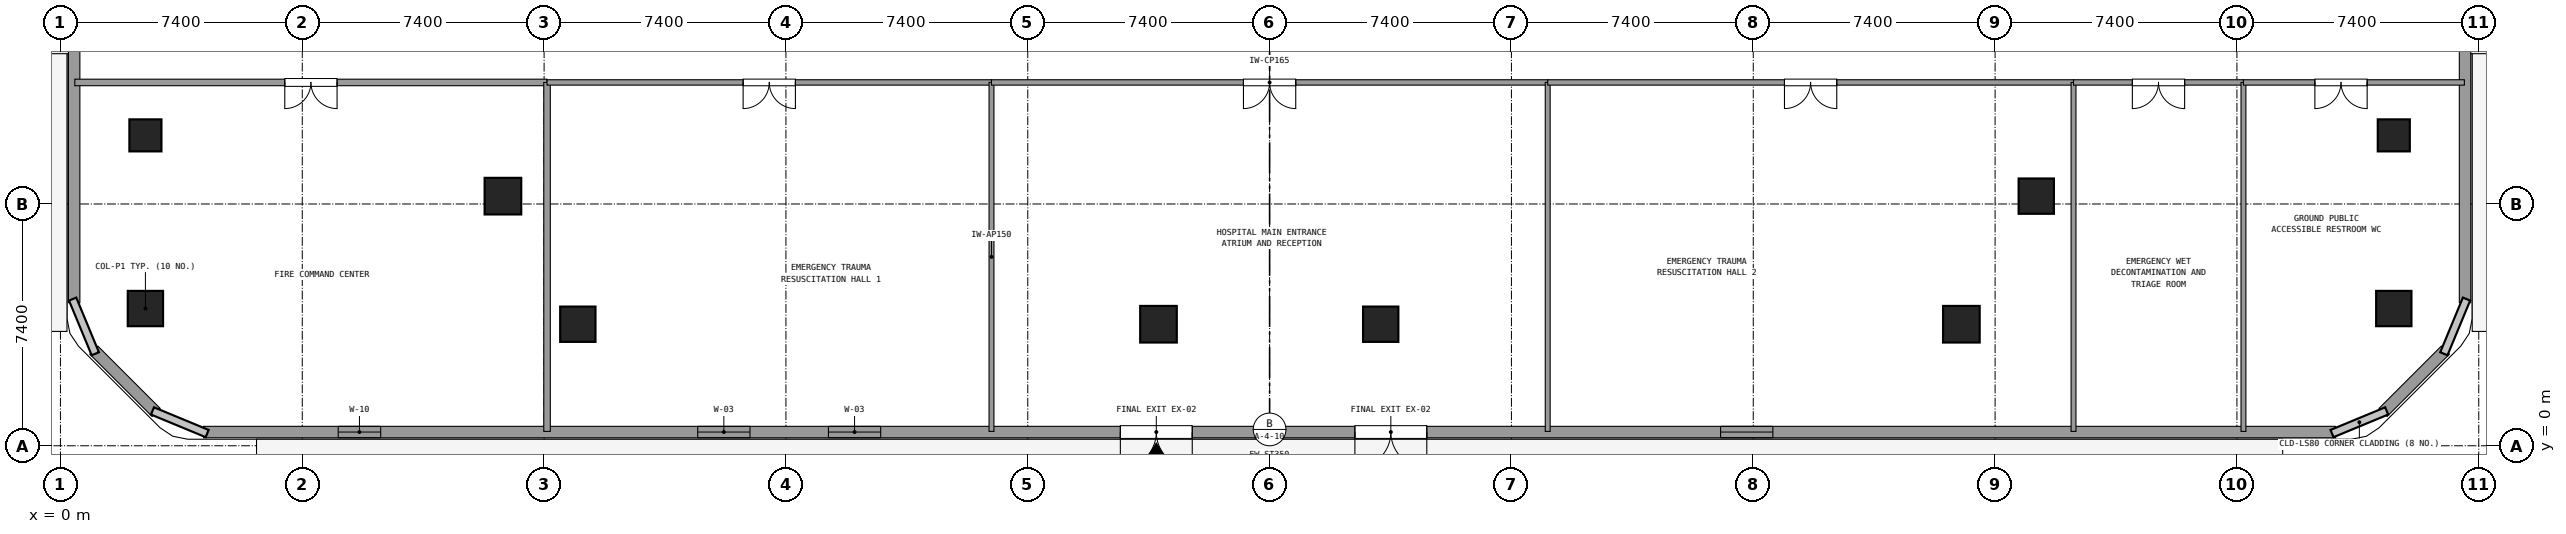
"""IFC4 building model, lengths in metres.
Left out: names, types, materials, properties, quantities, classifications, styles, units other than length and angle.
Written with IfcOpenShell. Run it as: python <this file> out.ifc"""

import sys

from ifc_helpers import new_model, si_unit, direction, frame, frame_2d, origin, origin_2d, place, context, subcontext, project, spatial, rectangle, circle, extrude, element, fill, save


model = new_model("IFC4")
c1 = context("Model", 3, precision=1e-05, world=origin(), true_north=direction((0.0, 1.0)))
c2 = subcontext(c1, "Body", "Model", "MODEL_VIEW")
j1 = project(units=[si_unit("LENGTHUNIT", "METRE"), si_unit("PLANEANGLEUNIT", "RADIAN")], contexts=[c1])
p1 = place(None, origin())
s1 = spatial("IfcSite", under=j1, at=p1, CompositionType="ELEMENT")
p2 = place(p1, origin())
s2 = spatial("IfcBuilding", under=s1, at=p2, CompositionType="ELEMENT")
p3 = place(p2, origin())
s3 = spatial("IfcBuildingStorey", under=s2, at=p3, CompositionType="ELEMENT", Elevation=0.0)
p4 = place(p3, frame((13.54, 7.64, 0.0), z_axis=(0.0, 0.0, 1.0), x_axis=(1.0, 0.0, 0.0)))
e1 = element("IfcColumn", 1, at=p4, inside=s3, PredefinedType="COLUMN", context=c2, shape_type="SweptSolid", body=[
    extrude(circle(Radius=0.56, at=origin_2d()), origin(), (0.0, 0.0, 1.0), 5.4),
])
p5 = place(p3, frame((15.832, 3.72, 0.0), z_axis=(0.0, 0.0, 1.0), x_axis=(1.0, 0.0, 0.0)))
e2 = element("IfcColumn", 2, at=p5, inside=s3, PredefinedType="COLUMN", context=c2, shape_type="SweptSolid", body=[
    extrude(rectangle(XDim=1.08, YDim=1.08, at=origin_2d()), origin(), (0.0, 0.0, 1.0), 5.4),
])
p6 = place(p3, frame((33.6, 3.72, 0.0), z_axis=(0.0, 0.0, 1.0), x_axis=(1.0, 0.0, 0.0)))
e3 = element("IfcColumn", 3, at=p6, inside=s3, PredefinedType="COLUMN", context=c2, shape_type="SweptSolid", body=[
    extrude(circle(Radius=0.56, at=origin_2d()), origin(), (0.0, 0.0, 1.0), 5.4),
])
p7 = place(p3, frame((40.4, 3.72, 0.0), z_axis=(0.0, 0.0, 1.0), x_axis=(1.0, 0.0, 0.0)))
e4 = element("IfcColumn", 4, at=p7, inside=s3, PredefinedType="COLUMN", context=c2, shape_type="SweptSolid", body=[
    extrude(rectangle(XDim=1.08, YDim=1.08, at=origin_2d()), origin(), (0.0, 0.0, 1.0), 5.4),
])
p8 = place(p3, frame((58.168, 3.72, 0.0), z_axis=(0.0, 0.0, 1.0), x_axis=(1.0, 0.0, 0.0)))
e5 = element("IfcColumn", 5, at=p8, inside=s3, PredefinedType="COLUMN", context=c2, shape_type="SweptSolid", body=[
    extrude(circle(Radius=0.56, at=origin_2d()), origin(), (0.0, 0.0, 1.0), 5.4),
])
for number, where, z_axis, x_axis in (
    (6, (60.46, 7.64, 0.0), (0.0, 0.0, 1.0), (1.0, 0.0, 0.0)),
    (7, (2.6, 4.2, 0.0), (0.0, 0.0, 1.0), (1.0, 0.0, 0.0)),
    (8, (71.4, 4.2, 0.0), (0.0, 0.0, 1.0), (1.0, 0.0, 0.0)),
):
    element("IfcColumn", number, at=place(p3, frame(where, z_axis=z_axis, x_axis=x_axis)), inside=s3, PredefinedType="COLUMN", context=c2, shape_type="SweptSolid", body=[
        extrude(rectangle(XDim=1.08, YDim=1.08, at=origin_2d()), origin(), (0.0, 0.0, 1.0), 5.4),
    ])
for number, where, z_axis, x_axis in (
    (9, (2.6, 9.5, 0.0), (0.0, 0.0, 1.0), (1.0, 0.0, 0.0)),
    (10, (71.4, 9.5, 0.0), (0.0, 0.0, 1.0), (1.0, 0.0, 0.0)),
):
    element("IfcColumn", number, at=place(p3, frame(where, z_axis=z_axis, x_axis=x_axis)), inside=s3, PredefinedType="PILASTER", context=c2, shape_type="SweptSolid", body=[
        extrude(circle(Radius=0.49, at=origin_2d()), origin(), (0.0, 0.0, 1.0), 5.4),
    ])
p9 = place(p3, frame((4.379, 0.42, 0.0), z_axis=(0.0, 0.0, 1.0), x_axis=(1.0, 0.0, 0.0)))
e11 = element("IfcWall", 11, at=p9, inside=s3, PredefinedType="SOLIDWALL", context=c2, shape_type="SweptSolid", body=[
    extrude(rectangle(XDim=65.242, YDim=0.35, at=frame_2d((32.621, 0.0))), origin(), (0.0, 0.0, 1.0), 4.14),
])
p10 = place(p9, frame((28.054, 0.0, 0.0)))
e12 = element("IfcOpeningElement", 12, at=p10, cuts=e11, PredefinedType="OPENING", context=c2, shape_type="SweptSolid", body=[
    extrude(rectangle(XDim=2.2, YDim=2.45, at=frame_2d((1.1, 1.225))), frame((0.0, 0.185, 0.0), z_axis=(0.0, -1.0, 0.0), x_axis=(1.0, 0.0, 0.0)), (0.0, 0.0, 1.0), 0.37),
])
p11 = place(p9, frame((35.231, 0.0, 0.0)))
e13 = element("IfcOpeningElement", 13, at=p11, cuts=e11, PredefinedType="OPENING", context=c2, shape_type="SweptSolid", body=[
    extrude(rectangle(XDim=2.2, YDim=2.45, at=frame_2d((1.1, 1.225))), frame((0.0, 0.185, 0.0), z_axis=(0.0, -1.0, 0.0), x_axis=(1.0, 0.0, 0.0)), (0.0, 0.0, 1.0), 0.37),
])
p12 = place(p9, frame((4.121, 0.0, 1.1)))
e14 = element("IfcOpeningElement", 14, at=p12, cuts=e11, PredefinedType="OPENING", context=c2, shape_type="SweptSolid", body=[
    extrude(rectangle(XDim=1.3, YDim=1.4, at=frame_2d((0.65, 0.7))), frame((0.0, 0.185, 0.0), z_axis=(0.0, -1.0, 0.0), x_axis=(1.0, 0.0, 0.0)), (0.0, 0.0, 1.0), 0.37),
])
p13 = place(p9, frame((15.121, 0.0, 1.05)))
e15 = element("IfcOpeningElement", 15, at=p13, cuts=e11, PredefinedType="OPENING", context=c2, shape_type="SweptSolid", body=[
    extrude(rectangle(XDim=1.6, YDim=1.5, at=frame_2d((0.8, 0.75))), frame((0.0, 0.185, 0.0), z_axis=(0.0, -1.0, 0.0), x_axis=(1.0, 0.0, 0.0)), (0.0, 0.0, 1.0), 0.37),
])
p14 = place(p9, frame((19.121, 0.0, 1.05)))
e16 = element("IfcOpeningElement", 16, at=p14, cuts=e11, PredefinedType="OPENING", context=c2, shape_type="SweptSolid", body=[
    extrude(rectangle(XDim=1.6, YDim=1.5, at=frame_2d((0.8, 0.75))), frame((0.0, 0.185, 0.0), z_axis=(0.0, -1.0, 0.0), x_axis=(1.0, 0.0, 0.0)), (0.0, 0.0, 1.0), 0.37),
])
p15 = place(p9, frame((46.421, 0.0, 1.05)))
e17 = element("IfcOpeningElement", 17, at=p15, cuts=e11, PredefinedType="OPENING", context=c2, shape_type="SweptSolid", body=[
    extrude(rectangle(XDim=1.6, YDim=1.5, at=frame_2d((0.8, 0.75))), frame((0.0, 0.185, 0.0), z_axis=(0.0, -1.0, 0.0), x_axis=(1.0, 0.0, 0.0)), (0.0, 0.0, 1.0), 0.37),
])
p16 = place(p3, frame((71.072, 1.021, 0.0), z_axis=(0.0, 0.0, 1.0), x_axis=(0.707106781187, 0.707106781187, 0.0)))
e18 = element("IfcWall", 18, at=p16, inside=s3, PredefinedType="SOLIDWALL", context=c2, shape_type="SweptSolid", body=[
    extrude(rectangle(XDim=2.697, YDim=0.35, at=frame_2d((1.348, 0.0))), origin(), (0.0, 0.0, 1.0), 4.14),
])
p17 = place(p3, frame((73.58, 4.379, 0.0), z_axis=(0.0, 0.0, 1.0), x_axis=(0.0, 1.0, 0.0)))
e19 = element("IfcWall", 19, at=p17, inside=s3, PredefinedType="SOLIDWALL", context=c2, shape_type="SweptSolid", body=[
    extrude(rectangle(XDim=43.042, YDim=0.35, at=frame_2d((21.521, 0.0))), origin(), (0.0, 0.0, 1.0), 4.14),
])
p18 = place(p17, frame((14.071, 0.0, 0.0)))
e20 = element("IfcOpeningElement", 20, at=p18, cuts=e19, PredefinedType="OPENING", context=c2, shape_type="SweptSolid", body=[
    extrude(rectangle(XDim=2.1, YDim=2.4, at=frame_2d((1.05, 1.2))), frame((0.0, 0.185, 0.0), z_axis=(0.0, -1.0, 0.0), x_axis=(1.0, 0.0, 0.0)), (0.0, 0.0, 1.0), 0.37),
])
p19 = place(p17, frame((37.121, 0.0, 0.0)))
e21 = element("IfcOpeningElement", 21, at=p19, cuts=e19, PredefinedType="OPENING", context=c2, shape_type="SweptSolid", body=[
    extrude(rectangle(XDim=3.8, YDim=2.85, at=frame_2d((1.9, 1.425))), frame((0.0, 0.185, 0.0), z_axis=(0.0, -1.0, 0.0), x_axis=(1.0, 0.0, 0.0)), (0.0, 0.0, 1.0), 0.37),
])
p20 = place(p3, frame((0.42, 47.421, 0.0), z_axis=(0.0, 0.0, 1.0), x_axis=(0.0, -1.0, 0.0)))
e22 = element("IfcWall", 22, at=p20, inside=s3, PredefinedType="SOLIDWALL", context=c2, shape_type="SweptSolid", body=[
    extrude(rectangle(XDim=43.042, YDim=0.35, at=frame_2d((21.521, 0.0))), origin(), (0.0, 0.0, 1.0), 4.14),
])
p21 = place(p20, frame((26.871, 0.0, 0.0)))
e23 = element("IfcOpeningElement", 23, at=p21, cuts=e22, PredefinedType="OPENING", context=c2, shape_type="SweptSolid", body=[
    extrude(rectangle(XDim=2.4, YDim=2.5, at=frame_2d((1.2, 1.25))), frame((0.0, 0.185, 0.0), z_axis=(0.0, -1.0, 0.0), x_axis=(1.0, 0.0, 0.0)), (0.0, 0.0, 1.0), 0.37),
])
p22 = place(p20, frame((2.5, 0.0, 1.2)))
e24 = element("IfcOpeningElement", 24, at=p22, cuts=e22, PredefinedType="OPENING", context=c2, shape_type="SweptSolid", body=[
    extrude(rectangle(XDim=2.2, YDim=1.6, at=frame_2d((1.1, 0.8))), frame((0.0, 0.185, 0.0), z_axis=(0.0, -1.0, 0.0), x_axis=(1.0, 0.0, 0.0)), (0.0, 0.0, 1.0), 0.37),
])
p23 = place(p3, frame((1.021, 2.928, 0.0), z_axis=(0.0, 0.0, 1.0), x_axis=(0.707106781187, -0.707106781187, 0.0)))
e25 = element("IfcWall", 25, at=p23, inside=s3, PredefinedType="SOLIDWALL", context=c2, shape_type="SweptSolid", body=[
    extrude(rectangle(XDim=2.697, YDim=0.35, at=frame_2d((1.348, 0.0))), origin(), (0.0, 0.0, 1.0), 4.14),
])
p24 = place(p3, frame((0.44, 11.12, 0.0), z_axis=(0.0, 0.0, 1.0), x_axis=(1.0, 0.0, 0.0)))
e26 = element("IfcWall", 26, at=p24, inside=s3, PredefinedType="SOLIDWALL", context=c2, shape_type="SweptSolid", body=[
    extrude(rectangle(XDim=14.45, YDim=0.2, at=frame_2d((7.225, 0.0))), origin(), (0.0, 0.0, 1.0), 4.11),
])
p25 = place(p24, frame((6.425, 0.0, 0.0)))
e27 = element("IfcOpeningElement", 27, at=p25, cuts=e26, PredefinedType="OPENING", context=c2, shape_type="SweptSolid", body=[
    extrude(rectangle(XDim=1.6, YDim=2.2, at=frame_2d((0.8, 1.1))), frame((0.0, 0.11, 0.0), z_axis=(0.0, -1.0, 0.0), x_axis=(1.0, 0.0, 0.0)), (0.0, 0.0, 1.0), 0.22),
])
p26 = place(p3, frame((14.89, 0.44, 0.0), z_axis=(0.0, 0.0, 1.0), x_axis=(0.0, 1.0, 0.0)))
e28 = element("IfcWall", 28, at=p26, inside=s3, PredefinedType="SOLIDWALL", context=c2, shape_type="SweptSolid", body=[
    extrude(rectangle(XDim=10.68, YDim=0.2, at=frame_2d((5.34, 0.0))), origin(), (0.0, 0.0, 1.0), 4.11),
])
p27 = place(p3, frame((14.89, 11.12, 0.0), z_axis=(0.0, 0.0, 1.0), x_axis=(1.0, 0.0, 0.0)))
e29 = element("IfcWall", 29, at=p27, inside=s3, PredefinedType="PARTITIONING", context=c2, shape_type="SweptSolid", body=[
    extrude(rectangle(XDim=13.6, YDim=0.165, at=frame_2d((6.8, 0.0))), origin(), (0.0, 0.0, 1.0), 4.11),
])
p28 = place(p27, frame((6.0, 0.0, 0.0)))
e30 = element("IfcOpeningElement", 30, at=p28, cuts=e29, PredefinedType="OPENING", context=c2, shape_type="SweptSolid", body=[
    extrude(rectangle(XDim=1.6, YDim=2.2, at=frame_2d((0.8, 1.1))), frame((0.0, 0.093, 0.0), z_axis=(0.0, -1.0, 0.0), x_axis=(1.0, 0.0, 0.0)), (0.0, 0.0, 1.0), 0.185),
])
p29 = place(p3, frame((28.49, 0.44, 0.0), z_axis=(0.0, 0.0, 1.0), x_axis=(0.0, 1.0, 0.0)))
e31 = element("IfcWall", 31, at=p29, inside=s3, PredefinedType="PARTITIONING", context=c2, shape_type="SweptSolid", body=[
    extrude(rectangle(XDim=10.68, YDim=0.15, at=frame_2d((5.34, 0.0))), origin(), (0.0, 0.0, 1.0), 4.11),
])
p30 = place(p3, frame((28.49, 11.12, 0.0), z_axis=(0.0, 0.0, 1.0), x_axis=(1.0, 0.0, 0.0)))
e32 = element("IfcWall", 32, at=p30, inside=s3, PredefinedType="PARTITIONING", context=c2, shape_type="SweptSolid", body=[
    extrude(rectangle(XDim=17.02, YDim=0.165, at=frame_2d((8.51, 0.0))), origin(), (0.0, 0.0, 1.0), 4.11),
])
p31 = place(p30, frame((7.71, 0.0, 0.0)))
e33 = element("IfcOpeningElement", 33, at=p31, cuts=e32, PredefinedType="OPENING", context=c2, shape_type="SweptSolid", body=[
    extrude(rectangle(XDim=1.6, YDim=2.2, at=frame_2d((0.8, 1.1))), frame((0.0, 0.093, 0.0), z_axis=(0.0, -1.0, 0.0), x_axis=(1.0, 0.0, 0.0)), (0.0, 0.0, 1.0), 0.185),
])
p32 = place(p3, frame((45.51, 0.44, 0.0), z_axis=(0.0, 0.0, 1.0), x_axis=(0.0, 1.0, 0.0)))
e34 = element("IfcWall", 34, at=p32, inside=s3, PredefinedType="PARTITIONING", context=c2, shape_type="SweptSolid", body=[
    extrude(rectangle(XDim=10.68, YDim=0.15, at=frame_2d((5.34, 0.0))), origin(), (0.0, 0.0, 1.0), 4.11),
])
p33 = place(p3, frame((45.51, 11.12, 0.0), z_axis=(0.0, 0.0, 1.0), x_axis=(1.0, 0.0, 0.0)))
e35 = element("IfcWall", 35, at=p33, inside=s3, PredefinedType="PARTITIONING", context=c2, shape_type="SweptSolid", body=[
    extrude(rectangle(XDim=16.09, YDim=0.165, at=frame_2d((8.045, 0.0))), origin(), (0.0, 0.0, 1.0), 4.11),
])
p34 = place(p33, frame((7.245, 0.0, 0.0)))
e36 = element("IfcOpeningElement", 36, at=p34, cuts=e35, PredefinedType="OPENING", context=c2, shape_type="SweptSolid", body=[
    extrude(rectangle(XDim=1.6, YDim=2.2, at=frame_2d((0.8, 1.1))), frame((0.0, 0.093, 0.0), z_axis=(0.0, -1.0, 0.0), x_axis=(1.0, 0.0, 0.0)), (0.0, 0.0, 1.0), 0.185),
])
p35 = place(p3, frame((61.6, 0.44, 0.0), z_axis=(0.0, 0.0, 1.0), x_axis=(0.0, 1.0, 0.0)))
e37 = element("IfcWall", 37, at=p35, inside=s3, PredefinedType="PARTITIONING", context=c2, shape_type="SweptSolid", body=[
    extrude(rectangle(XDim=10.68, YDim=0.15, at=frame_2d((5.34, 0.0))), origin(), (0.0, 0.0, 1.0), 4.11),
])
p36 = place(p3, frame((61.6, 11.12, 0.0), z_axis=(0.0, 0.0, 1.0), x_axis=(1.0, 0.0, 0.0)))
e38 = element("IfcWall", 38, at=p36, inside=s3, PredefinedType="PARTITIONING", context=c2, shape_type="SweptSolid", body=[
    extrude(rectangle(XDim=5.2, YDim=0.165, at=frame_2d((2.6, 0.0))), origin(), (0.0, 0.0, 1.0), 4.11),
])
p37 = place(p36, frame((1.8, 0.0, 0.0)))
e39 = element("IfcOpeningElement", 39, at=p37, cuts=e38, PredefinedType="OPENING", context=c2, shape_type="SweptSolid", body=[
    extrude(rectangle(XDim=1.6, YDim=2.2, at=frame_2d((0.8, 1.1))), frame((0.0, 0.093, 0.0), z_axis=(0.0, -1.0, 0.0), x_axis=(1.0, 0.0, 0.0)), (0.0, 0.0, 1.0), 0.185),
])
p38 = place(p3, frame((66.8, 0.44, 0.0), z_axis=(0.0, 0.0, 1.0), x_axis=(0.0, 1.0, 0.0)))
e40 = element("IfcWall", 40, at=p38, inside=s3, PredefinedType="PARTITIONING", context=c2, shape_type="SweptSolid", body=[
    extrude(rectangle(XDim=10.68, YDim=0.15, at=frame_2d((5.34, 0.0))), origin(), (0.0, 0.0, 1.0), 4.11),
])
p39 = place(p3, frame((66.8, 11.12, 0.0), z_axis=(0.0, 0.0, 1.0), x_axis=(1.0, 0.0, 0.0)))
e41 = element("IfcWall", 41, at=p39, inside=s3, PredefinedType="PARTITIONING", context=c2, shape_type="SweptSolid", body=[
    extrude(rectangle(XDim=6.76, YDim=0.165, at=frame_2d((3.38, 0.0))), origin(), (0.0, 0.0, 1.0), 4.11),
])
p40 = place(p39, frame((2.185, 0.0, 0.0)))
e42 = element("IfcOpeningElement", 42, at=p40, cuts=e41, PredefinedType="OPENING", context=c2, shape_type="SweptSolid", body=[
    extrude(rectangle(XDim=1.6, YDim=2.2, at=frame_2d((0.8, 1.1))), frame((0.0, 0.093, 0.0), z_axis=(0.0, -1.0, 0.0), x_axis=(1.0, 0.0, 0.0)), (0.0, 0.0, 1.0), 0.185),
])
p41 = place(p10, frame((2.2, 0.0, 0.0), z_axis=(0.0, 0.0, 1.0), x_axis=(-1.0, 0.0, 0.0)))
e43 = element("IfcDoor", 43, at=p41, inside=s3, OperationType="DOUBLE_DOOR_SINGLE_SWING", PredefinedType="DOOR", context=c2, shape_type="SweptSolid", body=[
    extrude(rectangle(XDim=2.2, YDim=2.45, at=frame_2d((1.1, 1.225))), frame((0.0, 0.025, 0.0), z_axis=(0.0, -1.0, 0.0), x_axis=(1.0, 0.0, 0.0)), (0.0, 0.0, 1.0), 0.05),
])
fill(e12, e43)
p42 = place(p11, frame((2.2, 0.0, 0.0), z_axis=(0.0, 0.0, 1.0), x_axis=(-1.0, 0.0, 0.0)))
e44 = element("IfcDoor", 44, at=p42, inside=s3, OperationType="DOUBLE_DOOR_SINGLE_SWING", PredefinedType="DOOR", context=c2, shape_type="SweptSolid", body=[
    extrude(rectangle(XDim=2.2, YDim=2.45, at=frame_2d((1.1, 1.225))), frame((0.0, 0.025, 0.0), z_axis=(0.0, -1.0, 0.0), x_axis=(1.0, 0.0, 0.0)), (0.0, 0.0, 1.0), 0.05),
])
fill(e13, e44)
p43 = place(p12, origin())
e45 = element("IfcWindow", 45, at=p43, inside=s3, PartitioningType="SINGLE_PANEL", PredefinedType="WINDOW", context=c2, shape_type="SweptSolid", body=[
    extrude(rectangle(XDim=1.3, YDim=1.4, at=frame_2d((0.65, 0.7))), frame((0.0, 0.03, 0.0), z_axis=(0.0, -1.0, 0.0), x_axis=(1.0, 0.0, 0.0)), (0.0, 0.0, 1.0), 0.06),
])
fill(e14, e45)
p44 = place(p13, origin())
e46 = element("IfcWindow", 46, at=p44, inside=s3, PartitioningType="SINGLE_PANEL", PredefinedType="WINDOW", context=c2, shape_type="SweptSolid", body=[
    extrude(rectangle(XDim=1.6, YDim=1.5, at=frame_2d((0.8, 0.75))), frame((0.0, 0.03, 0.0), z_axis=(0.0, -1.0, 0.0), x_axis=(1.0, 0.0, 0.0)), (0.0, 0.0, 1.0), 0.06),
])
fill(e15, e46)
p45 = place(p14, origin())
e47 = element("IfcWindow", 47, at=p45, inside=s3, PartitioningType="SINGLE_PANEL", PredefinedType="WINDOW", context=c2, shape_type="SweptSolid", body=[
    extrude(rectangle(XDim=1.6, YDim=1.5, at=frame_2d((0.8, 0.75))), frame((0.0, 0.03, 0.0), z_axis=(0.0, -1.0, 0.0), x_axis=(1.0, 0.0, 0.0)), (0.0, 0.0, 1.0), 0.06),
])
fill(e16, e47)
p46 = place(p15, origin())
e48 = element("IfcWindow", 48, at=p46, inside=s3, PartitioningType="SINGLE_PANEL", PredefinedType="WINDOW", context=c2, shape_type="SweptSolid", body=[
    extrude(rectangle(XDim=1.6, YDim=1.5, at=frame_2d((0.8, 0.75))), frame((0.0, 0.03, 0.0), z_axis=(0.0, -1.0, 0.0), x_axis=(1.0, 0.0, 0.0)), (0.0, 0.0, 1.0), 0.06),
])
fill(e17, e48)
p47 = place(p25, frame((1.6, 0.0, 0.0), z_axis=(0.0, 0.0, 1.0), x_axis=(-1.0, 0.0, 0.0)))
e49 = element("IfcDoor", 49, at=p47, inside=s3, OperationType="DOUBLE_DOOR_SINGLE_SWING", PredefinedType="DOOR", context=c2, shape_type="SweptSolid", body=[
    extrude(rectangle(XDim=1.6, YDim=2.2, at=frame_2d((0.8, 1.1))), frame((0.0, 0.025, 0.0), z_axis=(0.0, -1.0, 0.0), x_axis=(1.0, 0.0, 0.0)), (0.0, 0.0, 1.0), 0.05),
])
fill(e27, e49)
p48 = place(p28, frame((1.6, 0.0, 0.0), z_axis=(0.0, 0.0, 1.0), x_axis=(-1.0, 0.0, 0.0)))
e50 = element("IfcDoor", 50, at=p48, inside=s3, OperationType="DOUBLE_DOOR_SINGLE_SWING", PredefinedType="DOOR", context=c2, shape_type="SweptSolid", body=[
    extrude(rectangle(XDim=1.6, YDim=2.2, at=frame_2d((0.8, 1.1))), frame((0.0, 0.025, 0.0), z_axis=(0.0, -1.0, 0.0), x_axis=(1.0, 0.0, 0.0)), (0.0, 0.0, 1.0), 0.05),
])
fill(e30, e50)
p49 = place(p31, frame((1.6, 0.0, 0.0), z_axis=(0.0, 0.0, 1.0), x_axis=(-1.0, 0.0, 0.0)))
e51 = element("IfcDoor", 51, at=p49, inside=s3, OperationType="DOUBLE_DOOR_SINGLE_SWING", PredefinedType="DOOR", context=c2, shape_type="SweptSolid", body=[
    extrude(rectangle(XDim=1.6, YDim=2.2, at=frame_2d((0.8, 1.1))), frame((0.0, 0.025, 0.0), z_axis=(0.0, -1.0, 0.0), x_axis=(1.0, 0.0, 0.0)), (0.0, 0.0, 1.0), 0.05),
])
fill(e33, e51)
p50 = place(p34, frame((1.6, 0.0, 0.0), z_axis=(0.0, 0.0, 1.0), x_axis=(-1.0, 0.0, 0.0)))
e52 = element("IfcDoor", 52, at=p50, inside=s3, OperationType="DOUBLE_DOOR_SINGLE_SWING", PredefinedType="DOOR", context=c2, shape_type="SweptSolid", body=[
    extrude(rectangle(XDim=1.6, YDim=2.2, at=frame_2d((0.8, 1.1))), frame((0.0, 0.025, 0.0), z_axis=(0.0, -1.0, 0.0), x_axis=(1.0, 0.0, 0.0)), (0.0, 0.0, 1.0), 0.05),
])
fill(e36, e52)
p51 = place(p37, frame((1.6, 0.0, 0.0), z_axis=(0.0, 0.0, 1.0), x_axis=(-1.0, 0.0, 0.0)))
e53 = element("IfcDoor", 53, at=p51, inside=s3, OperationType="DOUBLE_DOOR_SINGLE_SWING", PredefinedType="DOOR", context=c2, shape_type="SweptSolid", body=[
    extrude(rectangle(XDim=1.6, YDim=2.2, at=frame_2d((0.8, 1.1))), frame((0.0, 0.025, 0.0), z_axis=(0.0, -1.0, 0.0), x_axis=(1.0, 0.0, 0.0)), (0.0, 0.0, 1.0), 0.05),
])
fill(e39, e53)
p52 = place(p40, frame((1.6, 0.0, 0.0), z_axis=(0.0, 0.0, 1.0), x_axis=(-1.0, 0.0, 0.0)))
e54 = element("IfcDoor", 54, at=p52, inside=s3, OperationType="DOUBLE_DOOR_SINGLE_SWING", PredefinedType="DOOR", context=c2, shape_type="SweptSolid", body=[
    extrude(rectangle(XDim=1.6, YDim=2.2, at=frame_2d((0.8, 1.1))), frame((0.0, 0.025, 0.0), z_axis=(0.0, -1.0, 0.0), x_axis=(1.0, 0.0, 0.0)), (0.0, 0.0, 1.0), 0.05),
])
fill(e42, e54)
save(model, sys.argv[1])
